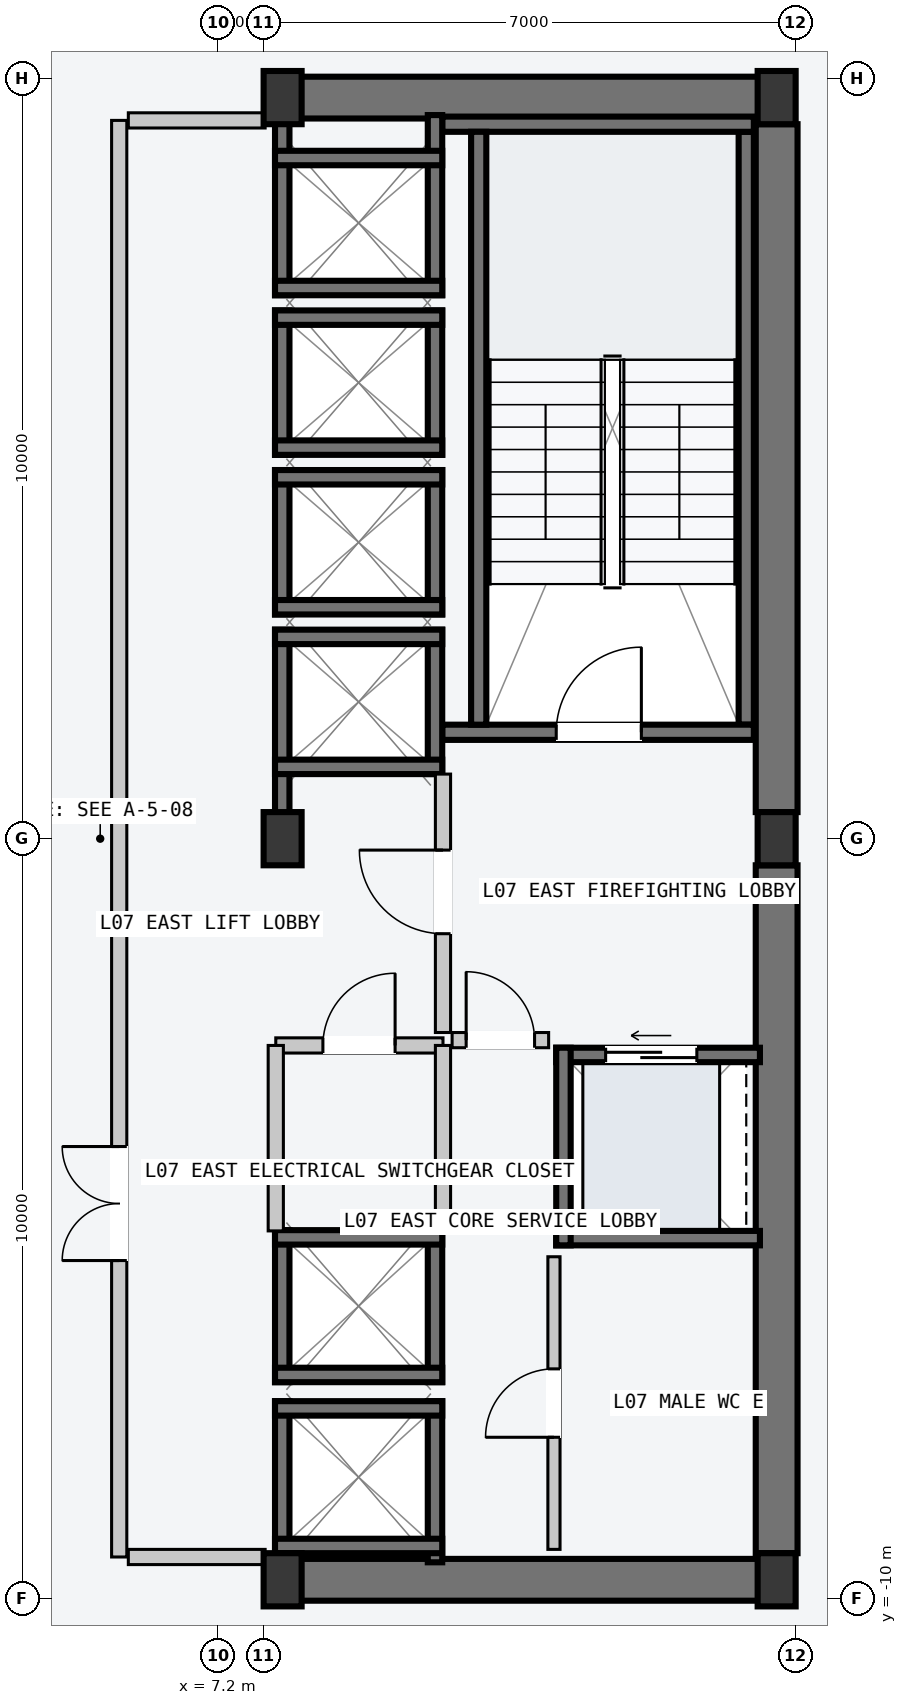
"""IFC4 building model, lengths in metres.
Left out: names, types, materials, properties, quantities, classifications, styles, units other than length and angle.
Written with IfcOpenShell. Run it as: python <this file> out.ifc"""

import sys

from ifc_helpers import new_model, si_unit, direction, frame, frame_2d, origin, origin_2d, place, context, subcontext, project, spatial, rectangle, i_section, extrude, element, fill, save


model = new_model("IFC4")
c1 = context("Model", 3, precision=1e-05, world=origin(), true_north=direction((0.0, 1.0)))
c2 = subcontext(c1, "Body", "Model", "MODEL_VIEW")
j1 = project(units=[si_unit("LENGTHUNIT", "METRE"), si_unit("PLANEANGLEUNIT", "RADIAN")], contexts=[c1])
p1 = place(None, origin())
s1 = spatial("IfcSite", under=j1, at=p1, CompositionType="ELEMENT")
p2 = place(p1, origin())
s2 = spatial("IfcBuilding", under=s1, at=p2, CompositionType="ELEMENT")
p3 = place(p2, frame((0.0, 0.0, 31.2)))
s3 = spatial("IfcBuildingStorey", under=s2, at=p3, CompositionType="ELEMENT", Elevation=31.2)
for number, where, z_axis, x_axis in (
    (1, (8.07, -9.75, -0.2), (0.0, 0.0, 1.0), (1.0, 0.0, 0.0)),
    (2, (8.07, 9.75, -0.2), (0.0, 0.0, 1.0), (1.0, 0.0, 0.0)),
):
    element("IfcWall", number, at=place(p3, frame(where, z_axis=z_axis, x_axis=x_axis)), inside=s3, PredefinedType="SHEAR", context=c2, shape_type="SweptSolid", body=[
        extrude(rectangle(XDim=6.46, YDim=0.55, at=frame_2d((3.23, 0.0))), origin(), (0.0, 0.0, 1.0), 3.6),
    ])
for number, where, z_axis, x_axis in (
    (3, (14.55, -9.4, -0.2), (0.0, 0.0, 1.0), (0.0, 1.0, 0.0)),
    (4, (14.55, 0.35, -0.2), (0.0, 0.0, 1.0), (0.0, 1.0, 0.0)),
):
    element("IfcWall", number, at=place(p3, frame(where, z_axis=z_axis, x_axis=x_axis)), inside=s3, PredefinedType="SHEAR", context=c2, shape_type="SweptSolid", body=[
        extrude(rectangle(XDim=9.05, YDim=0.55, at=frame_2d((4.525, 0.0))), origin(), (0.0, 0.0, 1.0), 3.6),
    ])
p4 = place(p3, frame((14.15, 1.5, -0.2), z_axis=(0.0, 0.0, 1.0), x_axis=(0.0, 1.0, 0.0)))
e5 = element("IfcWall", 5, at=p4, inside=s3, PredefinedType="SOLIDWALL", context=c2, shape_type="SweptSolid", body=[
    extrude(rectangle(XDim=7.8, YDim=0.2, at=frame_2d((3.9, 0.0))), origin(), (0.0, 0.0, 1.0), 3.6),
])
p5 = place(p3, frame((10.15, 1.4, -0.2), z_axis=(0.0, 0.0, 1.0), x_axis=(1.0, 0.0, 0.0)))
e6 = element("IfcWall", 6, at=p5, inside=s3, PredefinedType="SOLIDWALL", context=c2, shape_type="SweptSolid", body=[
    extrude(rectangle(XDim=4.1, YDim=0.2, at=frame_2d((2.05, 0.0))), origin(), (0.0, 0.0, 1.0), 3.6),
])
p6 = place(p5, frame((1.5, 0.0, 0.2)))
e7 = element("IfcOpeningElement", 7, at=p6, cuts=e6, PredefinedType="OPENING", context=c2, shape_type="SweptSolid", body=[
    extrude(rectangle(XDim=1.12, YDim=2.18, at=frame_2d((0.56, 1.09))), frame((0.0, 0.11, 0.0), z_axis=(0.0, -1.0, 0.0), x_axis=(1.0, 0.0, 0.0)), (0.0, 0.0, 1.0), 0.22),
])
p7 = place(p3, frame((10.15, 9.4, -0.2), z_axis=(0.0, 0.0, 1.0), x_axis=(1.0, 0.0, 0.0)))
e8 = element("IfcWall", 8, at=p7, inside=s3, PredefinedType="SOLIDWALL", context=c2, shape_type="SweptSolid", body=[
    extrude(rectangle(XDim=4.1, YDim=0.2, at=frame_2d((2.05, 0.0))), origin(), (0.0, 0.0, 1.0), 3.6),
])
p8 = place(p3, frame((10.63, 1.5, -0.2), z_axis=(0.0, 0.0, 1.0), x_axis=(0.0, 1.0, 0.0)))
e9 = element("IfcWall", 9, at=p8, inside=s3, PredefinedType="SOLIDWALL", context=c2, shape_type="SweptSolid", body=[
    extrude(rectangle(XDim=7.8, YDim=0.2, at=frame_2d((3.9, 0.0))), origin(), (0.0, 0.0, 1.0), 3.6),
])
for number, where, z_axis, x_axis in (
    (10, (8.05, -9.75, 0.0), (0.0, 0.0, 1.0), (1.0, 0.0, 0.0)),
    (11, (8.05, 0.0, 0.0), (0.0, 0.0, 1.0), (1.0, 0.0, 0.0)),
    (12, (8.05, 9.75, 0.0), (0.0, 0.0, 1.0), (1.0, 0.0, 0.0)),
    (13, (14.55, -9.75, 0.0), (0.0, 0.0, 1.0), (1.0, 0.0, 0.0)),
    (14, (14.55, 0.0, 0.0), (0.0, 0.0, 1.0), (1.0, 0.0, 0.0)),
    (15, (14.55, 9.75, 0.0), (0.0, 0.0, 1.0), (1.0, 0.0, 0.0)),
):
    element("IfcColumn", number, at=place(p3, frame(where, z_axis=z_axis, x_axis=x_axis)), inside=s3, PredefinedType="COLUMN", context=c2, shape_type="SweptSolid", body=[
        extrude(i_section(OverallWidth=0.5, OverallDepth=0.7, WebThickness=0.028, FlangeThickness=0.045, at=origin_2d()), origin(), (0.0, 0.0, 1.0), 3.6),
    ])
p9 = place(p3, frame((8.045, 0.21, -0.2), z_axis=(0.0, 0.0, 1.0), x_axis=(0.0, 1.0, 0.0)))
e16 = element("IfcWall", 16, at=p9, inside=s3, PredefinedType="SOLIDWALL", context=c2, shape_type="SweptSolid", body=[
    extrude(rectangle(XDim=2.54, YDim=0.19, at=frame_2d((1.27, 0.0))), origin(), (0.0, 0.0, 1.0), 3.6),
])
p10 = place(p3, frame((10.055, 0.85, -0.2), z_axis=(0.0, 0.0, 1.0), x_axis=(0.0, 1.0, 0.0)))
e17 = element("IfcWall", 17, at=p10, inside=s3, PredefinedType="SOLIDWALL", context=c2, shape_type="SweptSolid", body=[
    extrude(rectangle(XDim=1.9, YDim=0.19, at=frame_2d((0.95, 0.0))), origin(), (0.0, 0.0, 1.0), 3.6),
])
for number, where, z_axis, x_axis in (
    (18, (7.95, 2.655, -0.2), (0.0, 0.0, 1.0), (1.0, 0.0, 0.0)),
    (19, (7.95, 0.945, -0.2), (0.0, 0.0, 1.0), (1.0, 0.0, 0.0)),
):
    element("IfcWall", number, at=place(p3, frame(where, z_axis=z_axis, x_axis=x_axis)), inside=s3, PredefinedType="SOLIDWALL", context=c2, shape_type="SweptSolid", body=[
        extrude(rectangle(XDim=2.2, YDim=0.19, at=frame_2d((1.1, 0.0))), origin(), (0.0, 0.0, 1.0), 3.6),
    ])
for number, where, z_axis, x_axis in (
    (20, (8.045, 2.95, -0.2), (0.0, 0.0, 1.0), (0.0, 1.0, 0.0)),
    (21, (10.055, 2.95, -0.2), (0.0, 0.0, 1.0), (0.0, 1.0, 0.0)),
):
    element("IfcWall", number, at=place(p3, frame(where, z_axis=z_axis, x_axis=x_axis)), inside=s3, PredefinedType="SOLIDWALL", context=c2, shape_type="SweptSolid", body=[
        extrude(rectangle(XDim=1.9, YDim=0.19, at=frame_2d((0.95, 0.0))), origin(), (0.0, 0.0, 1.0), 3.6),
    ])
for number, where, z_axis, x_axis in (
    (22, (7.95, 4.755, -0.2), (0.0, 0.0, 1.0), (1.0, 0.0, 0.0)),
    (23, (7.95, 3.045, -0.2), (0.0, 0.0, 1.0), (1.0, 0.0, 0.0)),
):
    element("IfcWall", number, at=place(p3, frame(where, z_axis=z_axis, x_axis=x_axis)), inside=s3, PredefinedType="SOLIDWALL", context=c2, shape_type="SweptSolid", body=[
        extrude(rectangle(XDim=2.2, YDim=0.19, at=frame_2d((1.1, 0.0))), origin(), (0.0, 0.0, 1.0), 3.6),
    ])
for number, where, z_axis, x_axis in (
    (24, (8.045, 5.05, -0.2), (0.0, 0.0, 1.0), (0.0, 1.0, 0.0)),
    (25, (10.055, 5.05, -0.2), (0.0, 0.0, 1.0), (0.0, 1.0, 0.0)),
):
    element("IfcWall", number, at=place(p3, frame(where, z_axis=z_axis, x_axis=x_axis)), inside=s3, PredefinedType="SOLIDWALL", context=c2, shape_type="SweptSolid", body=[
        extrude(rectangle(XDim=1.9, YDim=0.19, at=frame_2d((0.95, 0.0))), origin(), (0.0, 0.0, 1.0), 3.6),
    ])
for number, where, z_axis, x_axis in (
    (26, (7.95, 6.855, -0.2), (0.0, 0.0, 1.0), (1.0, 0.0, 0.0)),
    (27, (7.95, 5.145, -0.2), (0.0, 0.0, 1.0), (1.0, 0.0, 0.0)),
):
    element("IfcWall", number, at=place(p3, frame(where, z_axis=z_axis, x_axis=x_axis)), inside=s3, PredefinedType="SOLIDWALL", context=c2, shape_type="SweptSolid", body=[
        extrude(rectangle(XDim=2.2, YDim=0.19, at=frame_2d((1.1, 0.0))), origin(), (0.0, 0.0, 1.0), 3.6),
    ])
for number, where, z_axis, x_axis in (
    (28, (8.045, 7.15, -0.2), (0.0, 0.0, 1.0), (0.0, 1.0, 0.0)),
    (29, (10.055, 7.15, -0.2), (0.0, 0.0, 1.0), (0.0, 1.0, 0.0)),
):
    element("IfcWall", number, at=place(p3, frame(where, z_axis=z_axis, x_axis=x_axis)), inside=s3, PredefinedType="SOLIDWALL", context=c2, shape_type="SweptSolid", body=[
        extrude(rectangle(XDim=2.37, YDim=0.19, at=frame_2d((1.185, 0.0))), origin(), (0.0, 0.0, 1.0), 3.6),
    ])
for number, where, z_axis, x_axis in (
    (30, (7.95, 8.955, -0.2), (0.0, 0.0, 1.0), (1.0, 0.0, 0.0)),
    (31, (7.95, 7.245, -0.2), (0.0, 0.0, 1.0), (1.0, 0.0, 0.0)),
):
    element("IfcWall", number, at=place(p3, frame(where, z_axis=z_axis, x_axis=x_axis)), inside=s3, PredefinedType="SOLIDWALL", context=c2, shape_type="SweptSolid", body=[
        extrude(rectangle(XDim=2.2, YDim=0.19, at=frame_2d((1.1, 0.0))), origin(), (0.0, 0.0, 1.0), 3.6),
    ])
for number, where, z_axis, x_axis in (
    (32, (8.045, -9.52, -0.2), (0.0, 0.0, 1.0), (0.0, 1.0, 0.0)),
    (33, (10.055, -9.52, -0.2), (0.0, 0.0, 1.0), (0.0, 1.0, 0.0)),
):
    element("IfcWall", number, at=place(p3, frame(where, z_axis=z_axis, x_axis=x_axis)), inside=s3, PredefinedType="SOLIDWALL", context=c2, shape_type="SweptSolid", body=[
        extrude(rectangle(XDim=2.12, YDim=0.19, at=frame_2d((1.06, 0.0))), origin(), (0.0, 0.0, 1.0), 3.6),
    ])
for number, where, z_axis, x_axis in (
    (34, (7.95, -7.495, -0.2), (0.0, 0.0, 1.0), (1.0, 0.0, 0.0)),
    (35, (7.95, -9.305, -0.2), (0.0, 0.0, 1.0), (1.0, 0.0, 0.0)),
):
    element("IfcWall", number, at=place(p3, frame(where, z_axis=z_axis, x_axis=x_axis)), inside=s3, PredefinedType="SOLIDWALL", context=c2, shape_type="SweptSolid", body=[
        extrude(rectangle(XDim=2.2, YDim=0.19, at=frame_2d((1.1, 0.0))), origin(), (0.0, 0.0, 1.0), 3.6),
    ])
for number, where, z_axis, x_axis in (
    (36, (8.045, -7.15, -0.2), (0.0, 0.0, 1.0), (0.0, 1.0, 0.0)),
    (37, (10.055, -7.15, -0.2), (0.0, 0.0, 1.0), (0.0, 1.0, 0.0)),
):
    element("IfcWall", number, at=place(p3, frame(where, z_axis=z_axis, x_axis=x_axis)), inside=s3, PredefinedType="SOLIDWALL", context=c2, shape_type="SweptSolid", body=[
        extrude(rectangle(XDim=2.0, YDim=0.19, at=frame_2d((1.0, 0.0))), origin(), (0.0, 0.0, 1.0), 3.6),
    ])
for number, where, z_axis, x_axis in (
    (38, (7.95, -5.245, -0.2), (0.0, 0.0, 1.0), (1.0, 0.0, 0.0)),
    (39, (7.95, -7.055, -0.2), (0.0, 0.0, 1.0), (1.0, 0.0, 0.0)),
):
    element("IfcWall", number, at=place(p3, frame(where, z_axis=z_axis, x_axis=x_axis)), inside=s3, PredefinedType="SOLIDWALL", context=c2, shape_type="SweptSolid", body=[
        extrude(rectangle(XDim=2.2, YDim=0.19, at=frame_2d((1.1, 0.0))), origin(), (0.0, 0.0, 1.0), 3.6),
    ])
p11 = place(p3, frame((11.65, -2.845, -0.2), z_axis=(0.0, 0.0, 1.0), x_axis=(1.0, 0.0, 0.0)))
e40 = element("IfcWall", 40, at=p11, inside=s3, PredefinedType="SOLIDWALL", context=c2, shape_type="SweptSolid", body=[
    extrude(rectangle(XDim=2.68, YDim=0.19, at=frame_2d((1.34, 0.0))), origin(), (0.0, 0.0, 1.0), 3.6),
])
p12 = place(p11, frame((0.65, 0.0, 0.2)))
e41 = element("IfcOpeningElement", 41, at=p12, cuts=e40, PredefinedType="OPENING", context=c2, shape_type="SweptSolid", body=[
    extrude(rectangle(XDim=1.2, YDim=2.2, at=frame_2d((0.6, 1.1))), frame((0.0, 0.105, 0.0), z_axis=(0.0, -1.0, 0.0), x_axis=(1.0, 0.0, 0.0)), (0.0, 0.0, 1.0), 0.21),
])
p13 = place(p3, frame((11.65, -5.255, -0.2), z_axis=(0.0, 0.0, 1.0), x_axis=(1.0, 0.0, 0.0)))
e42 = element("IfcWall", 42, at=p13, inside=s3, PredefinedType="SOLIDWALL", context=c2, shape_type="SweptSolid", body=[
    extrude(rectangle(XDim=2.68, YDim=0.19, at=frame_2d((1.34, 0.0))), origin(), (0.0, 0.0, 1.0), 3.6),
])
p14 = place(p3, frame((11.745, -5.35, -0.2), z_axis=(0.0, 0.0, 1.0), x_axis=(0.0, 1.0, 0.0)))
e43 = element("IfcWall", 43, at=p14, inside=s3, PredefinedType="SOLIDWALL", context=c2, shape_type="SweptSolid", body=[
    extrude(rectangle(XDim=2.6, YDim=0.19, at=frame_2d((1.3, 0.0))), origin(), (0.0, 0.0, 1.0), 3.6),
])
p15 = place(p3, frame((5.9, -9.45, 0.0), z_axis=(0.0, 0.0, 1.0), x_axis=(0.0, 1.0, 0.0)))
e44 = element("IfcWall", 44, at=p15, inside=s3, PredefinedType="PARTITIONING", context=c2, shape_type="SweptSolid", body=[
    extrude(rectangle(XDim=18.9, YDim=0.2, at=frame_2d((9.45, 0.0))), origin(), (0.0, 0.0, 1.0), 3.4),
])
p16 = place(p15, frame((3.9, 0.0, 0.0)))
e45 = element("IfcOpeningElement", 45, at=p16, cuts=e44, PredefinedType="OPENING", context=c2, shape_type="SweptSolid", body=[
    extrude(rectangle(XDim=1.5, YDim=2.2, at=frame_2d((0.75, 1.1))), frame((0.0, 0.11, 0.0), z_axis=(0.0, -1.0, 0.0), x_axis=(1.0, 0.0, 0.0)), (0.0, 0.0, 1.0), 0.22),
])
for number, where, z_axis, x_axis in (
    (46, (6.02, -9.45, 0.0), (0.0, 0.0, 1.0), (1.0, 0.0, 0.0)),
    (47, (6.02, 9.45, 0.0), (0.0, 0.0, 1.0), (1.0, 0.0, 0.0)),
):
    element("IfcWall", number, at=place(p3, frame(where, z_axis=z_axis, x_axis=x_axis)), inside=s3, PredefinedType="PARTITIONING", context=c2, shape_type="SweptSolid", body=[
        extrude(rectangle(XDim=1.8, YDim=0.2, at=frame_2d((0.9, 0.0))), origin(), (0.0, 0.0, 1.0), 3.4),
    ])
p17 = place(p3, frame((10.16, -2.55, 0.0), z_axis=(0.0, 0.0, 1.0), x_axis=(0.0, 1.0, 0.0)))
e48 = element("IfcWall", 48, at=p17, inside=s3, PredefinedType="PARTITIONING", context=c2, shape_type="SweptSolid", body=[
    extrude(rectangle(XDim=3.4, YDim=0.2, at=frame_2d((1.7, 0.0))), origin(), (0.0, 0.0, 1.0), 3.4),
])
p18 = place(p17, frame((1.3, 0.0, 0.0)))
e49 = element("IfcOpeningElement", 49, at=p18, cuts=e48, PredefinedType="OPENING", context=c2, shape_type="SweptSolid", body=[
    extrude(rectangle(XDim=1.1, YDim=2.15, at=frame_2d((0.55, 1.075))), frame((0.0, 0.11, 0.0), z_axis=(0.0, -1.0, 0.0), x_axis=(1.0, 0.0, 0.0)), (0.0, 0.0, 1.0), 0.22),
])
p19 = place(p3, frame((10.28, -2.65, 0.0), z_axis=(0.0, 0.0, 1.0), x_axis=(1.0, 0.0, 0.0)))
e50 = element("IfcWall", 50, at=p19, inside=s3, PredefinedType="PARTITIONING", context=c2, shape_type="SweptSolid", body=[
    extrude(rectangle(XDim=1.27, YDim=0.2, at=frame_2d((0.635, 0.0))), origin(), (0.0, 0.0, 1.0), 3.4),
])
p20 = place(p19, frame((0.185, 0.0, 0.0)))
e51 = element("IfcOpeningElement", 51, at=p20, cuts=e50, PredefinedType="OPENING", context=c2, shape_type="SweptSolid", body=[
    extrude(rectangle(XDim=0.9, YDim=2.15, at=frame_2d((0.45, 1.075))), frame((0.0, 0.11, 0.0), z_axis=(0.0, -1.0, 0.0), x_axis=(1.0, 0.0, 0.0)), (0.0, 0.0, 1.0), 0.22),
])
p21 = place(p3, frame((7.96, -2.72, 0.0), z_axis=(0.0, 0.0, 1.0), x_axis=(1.0, 0.0, 0.0)))
e52 = element("IfcWall", 52, at=p21, inside=s3, PredefinedType="PARTITIONING", context=c2, shape_type="SweptSolid", body=[
    extrude(rectangle(XDim=2.2, YDim=0.2, at=frame_2d((1.1, 0.0))), origin(), (0.0, 0.0, 1.0), 3.4),
])
p22 = place(p21, frame((0.62, 0.0, 0.0)))
e53 = element("IfcOpeningElement", 53, at=p22, cuts=e52, PredefinedType="OPENING", context=c2, shape_type="SweptSolid", body=[
    extrude(rectangle(XDim=0.95, YDim=2.1, at=frame_2d((0.475, 1.05))), frame((0.0, 0.11, 0.0), z_axis=(0.0, -1.0, 0.0), x_axis=(1.0, 0.0, 0.0)), (0.0, 0.0, 1.0), 0.22),
])
for number, where, z_axis, x_axis in (
    (54, (7.96, -5.16, 0.0), (0.0, 0.0, 1.0), (0.0, 1.0, 0.0)),
    (55, (10.16, -5.16, 0.0), (0.0, 0.0, 1.0), (0.0, 1.0, 0.0)),
):
    element("IfcWall", number, at=place(p3, frame(where, z_axis=z_axis, x_axis=x_axis)), inside=s3, PredefinedType="PARTITIONING", context=c2, shape_type="SweptSolid", body=[
        extrude(rectangle(XDim=2.44, YDim=0.2, at=frame_2d((1.22, 0.0))), origin(), (0.0, 0.0, 1.0), 3.4),
    ])
p23 = place(p3, frame((11.62, -9.35, 0.0), z_axis=(0.0, 0.0, 1.0), x_axis=(0.0, 1.0, 0.0)))
e56 = element("IfcWall", 56, at=p23, inside=s3, PredefinedType="PARTITIONING", context=c2, shape_type="SweptSolid", body=[
    extrude(rectangle(XDim=3.85, YDim=0.16, at=frame_2d((1.925, 0.0))), origin(), (0.0, 0.0, 1.0), 3.4),
])
p24 = place(p23, frame((1.475, 0.0, 0.0)))
e57 = element("IfcOpeningElement", 57, at=p24, cuts=e56, PredefinedType="OPENING", context=c2, shape_type="SweptSolid", body=[
    extrude(rectangle(XDim=0.9, YDim=2.15, at=frame_2d((0.45, 1.075))), frame((0.0, 0.09, 0.0), z_axis=(0.0, -1.0, 0.0), x_axis=(1.0, 0.0, 0.0)), (0.0, 0.0, 1.0), 0.18),
])
p25 = place(p6, origin())
e58 = element("IfcDoor", 58, at=p25, inside=s3, OperationType="SINGLE_SWING_RIGHT", PredefinedType="DOOR", context=c2, shape_type="SweptSolid", body=[
    extrude(rectangle(XDim=1.12, YDim=2.18, at=frame_2d((0.56, 1.09))), frame((0.0, 0.025, 0.0), z_axis=(0.0, -1.0, 0.0), x_axis=(1.0, 0.0, 0.0)), (0.0, 0.0, 1.0), 0.05),
])
fill(e7, e58)
p26 = place(p12, origin())
e59 = element("IfcDoor", 59, at=p26, inside=s3, OperationType="SLIDING_TO_LEFT", PredefinedType="DOOR", context=c2, shape_type="SweptSolid", body=[
    extrude(rectangle(XDim=1.2, YDim=2.2, at=frame_2d((0.6, 1.1))), frame((0.0, 0.025, 0.0), z_axis=(0.0, -1.0, 0.0), x_axis=(1.0, 0.0, 0.0)), (0.0, 0.0, 1.0), 0.05),
])
fill(e41, e59)
p27 = place(p16, origin())
e60 = element("IfcDoor", 60, at=p27, inside=s3, OperationType="DOUBLE_DOOR_SINGLE_SWING", PredefinedType="DOOR", context=c2, shape_type="SweptSolid", body=[
    extrude(rectangle(XDim=1.5, YDim=2.2, at=frame_2d((0.75, 1.1))), frame((0.0, 0.025, 0.0), z_axis=(0.0, -1.0, 0.0), x_axis=(1.0, 0.0, 0.0)), (0.0, 0.0, 1.0), 0.05),
])
fill(e45, e60)
p28 = place(p18, origin())
e61 = element("IfcDoor", 61, at=p28, inside=s3, OperationType="SINGLE_SWING_RIGHT", PredefinedType="DOOR", context=c2, shape_type="SweptSolid", body=[
    extrude(rectangle(XDim=1.1, YDim=2.15, at=frame_2d((0.55, 1.075))), frame((0.0, 0.025, 0.0), z_axis=(0.0, -1.0, 0.0), x_axis=(1.0, 0.0, 0.0)), (0.0, 0.0, 1.0), 0.05),
])
fill(e49, e61)
p29 = place(p20, origin())
e62 = element("IfcDoor", 62, at=p29, inside=s3, OperationType="SINGLE_SWING_LEFT", PredefinedType="DOOR", context=c2, shape_type="SweptSolid", body=[
    extrude(rectangle(XDim=0.9, YDim=2.15, at=frame_2d((0.45, 1.075))), frame((0.0, 0.025, 0.0), z_axis=(0.0, -1.0, 0.0), x_axis=(1.0, 0.0, 0.0)), (0.0, 0.0, 1.0), 0.05),
])
fill(e51, e62)
p30 = place(p22, origin())
e63 = element("IfcDoor", 63, at=p30, inside=s3, OperationType="SINGLE_SWING_RIGHT", PredefinedType="DOOR", context=c2, shape_type="SweptSolid", body=[
    extrude(rectangle(XDim=0.95, YDim=2.1, at=frame_2d((0.475, 1.05))), frame((0.0, 0.025, 0.0), z_axis=(0.0, -1.0, 0.0), x_axis=(1.0, 0.0, 0.0)), (0.0, 0.0, 1.0), 0.05),
])
fill(e53, e63)
p31 = place(p24, origin())
e64 = element("IfcDoor", 64, at=p31, inside=s3, OperationType="SINGLE_SWING_LEFT", PredefinedType="DOOR", context=c2, shape_type="SweptSolid", body=[
    extrude(rectangle(XDim=0.9, YDim=2.15, at=frame_2d((0.45, 1.075))), frame((0.0, 0.025, 0.0), z_axis=(0.0, -1.0, 0.0), x_axis=(1.0, 0.0, 0.0)), (0.0, 0.0, 1.0), 0.05),
])
fill(e57, e64)
save(model, sys.argv[1])
